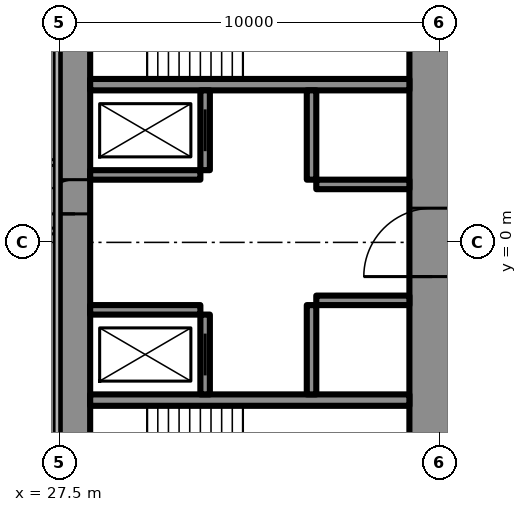
"""IFC4 building model, lengths in metres.
Left out: names, types, materials, properties, quantities, classifications, styles, units other than length and angle.
Written with IfcOpenShell. Run it as: python <this file> out.ifc"""

import sys

from ifc_helpers import new_model, si_unit, direction, frame, frame_2d, origin, place, context, subcontext, project, spatial, rectangle, extrude, element, fill, save


model = new_model("IFC4")
c1 = context("Model", 3, precision=1e-05, world=origin(), true_north=direction((0.0, 1.0)))
c2 = subcontext(c1, "Body", "Model", "MODEL_VIEW")
j1 = project(units=[si_unit("LENGTHUNIT", "METRE"), si_unit("PLANEANGLEUNIT", "RADIAN")], contexts=[c1])
p1 = place(None, origin())
s1 = spatial("IfcSite", under=j1, at=p1, CompositionType="ELEMENT")
p2 = place(p1, origin())
s2 = spatial("IfcBuilding", under=s1, at=p2, CompositionType="ELEMENT")
p3 = place(p2, frame((0.0, 0.0, 244.1)))
s3 = spatial("IfcBuildingStorey", under=s2, at=p3, CompositionType="ELEMENT", Elevation=244.1)
p4 = place(p3, frame((27.9, -8.6, 0.0), z_axis=(0.0, 0.0, 1.0), x_axis=(0.0, 1.0, 0.0)))
e1 = element("IfcWall", 1, at=p4, inside=s3, PredefinedType="SHEAR", context=c2, shape_type="SweptSolid", body=[
    extrude(rectangle(XDim=17.2, YDim=0.8, at=frame_2d((8.6, 0.0))), origin(), (0.0, 0.0, 1.0), 3.6),
])
p5 = place(p4, frame((9.35, 0.0, 0.0)))
e2 = element("IfcOpeningElement", 2, at=p5, cuts=e1, PredefinedType="OPENING", context=c2, shape_type="SweptSolid", body=[
    extrude(rectangle(XDim=0.9, YDim=2.2, at=frame_2d((0.45, 1.1))), frame((0.0, 0.41, 0.0), z_axis=(0.0, -1.0, 0.0), x_axis=(1.0, 0.0, 0.0)), (0.0, 0.0, 1.0), 0.82),
])
p6 = place(p3, frame((37.3, -8.6, 0.0), z_axis=(0.0, 0.0, 1.0), x_axis=(0.0, 1.0, 0.0)))
e3 = element("IfcWall", 3, at=p6, inside=s3, PredefinedType="SHEAR", context=c2, shape_type="SweptSolid", body=[
    extrude(rectangle(XDim=17.2, YDim=1.2, at=frame_2d((8.6, 0.0))), origin(), (0.0, 0.0, 1.0), 3.6),
])
p7 = place(p6, frame((7.7, 0.0, 0.0)))
e4 = element("IfcOpeningElement", 4, at=p7, cuts=e3, PredefinedType="OPENING", context=c2, shape_type="SweptSolid", body=[
    extrude(rectangle(XDim=1.8, YDim=2.2, at=frame_2d((0.9, 1.1))), frame((0.0, 0.61, 0.0), z_axis=(0.0, -1.0, 0.0), x_axis=(1.0, 0.0, 0.0)), (0.0, 0.0, 1.0), 1.22),
])
for number, where, z_axis, x_axis in (
    (5, (28.3, -4.15, 0.0), (0.0, 0.0, 1.0), (1.0, 0.0, 0.0)),
    (6, (28.3, 4.15, 0.0), (0.0, 0.0, 1.0), (1.0, 0.0, 0.0)),
):
    element("IfcWall", number, at=place(p3, frame(where, z_axis=z_axis, x_axis=x_axis)), inside=s3, PredefinedType="SHEAR", context=c2, shape_type="SweptSolid", body=[
        extrude(rectangle(XDim=8.4, YDim=0.3, at=frame_2d((4.2, 0.0))), origin(), (0.0, 0.0, 1.0), 3.6),
    ])
p8 = place(p3, frame((31.325, -4.0, 0.0), z_axis=(0.0, 0.0, 1.0), x_axis=(0.0, 1.0, 0.0)))
e7 = element("IfcWall", 7, at=p8, inside=s3, PredefinedType="SHEAR", context=c2, shape_type="SweptSolid", body=[
    extrude(rectangle(XDim=2.1, YDim=0.25, at=frame_2d((1.05, 0.0))), origin(), (0.0, 0.0, 1.0), 3.6),
])
p9 = place(p8, frame((0.5, 0.0, 0.0)))
e8 = element("IfcOpeningElement", 8, at=p9, cuts=e7, PredefinedType="OPENING", context=c2, shape_type="SweptSolid", body=[
    extrude(rectangle(XDim=1.1, YDim=2.2, at=frame_2d((0.55, 1.1))), frame((0.0, 0.135, 0.0), z_axis=(0.0, -1.0, 0.0), x_axis=(1.0, 0.0, 0.0)), (0.0, 0.0, 1.0), 0.27),
])
p10 = place(p3, frame((34.125, -4.0, 0.0), z_axis=(0.0, 0.0, 1.0), x_axis=(0.0, 1.0, 0.0)))
e9 = element("IfcWall", 9, at=p10, inside=s3, PredefinedType="SHEAR", context=c2, shape_type="SweptSolid", body=[
    extrude(rectangle(XDim=2.35, YDim=0.25, at=frame_2d((1.175, 0.0))), origin(), (0.0, 0.0, 1.0), 3.6),
])
p11 = place(p3, frame((28.3, -1.775, 0.0), z_axis=(0.0, 0.0, 1.0), x_axis=(1.0, 0.0, 0.0)))
e10 = element("IfcWall", 10, at=p11, inside=s3, PredefinedType="SHEAR", context=c2, shape_type="SweptSolid", body=[
    extrude(rectangle(XDim=2.9, YDim=0.25, at=frame_2d((1.45, 0.0))), origin(), (0.0, 0.0, 1.0), 3.6),
])
p12 = place(p3, frame((34.25, -1.525, 0.0), z_axis=(0.0, 0.0, 1.0), x_axis=(1.0, 0.0, 0.0)))
e11 = element("IfcWall", 11, at=p12, inside=s3, PredefinedType="SHEAR", context=c2, shape_type="SweptSolid", body=[
    extrude(rectangle(XDim=2.45, YDim=0.25, at=frame_2d((1.225, 0.0))), origin(), (0.0, 0.0, 1.0), 3.6),
])
p13 = place(p3, frame((31.325, 1.9, 0.0), z_axis=(0.0, 0.0, 1.0), x_axis=(0.0, 1.0, 0.0)))
e12 = element("IfcWall", 12, at=p13, inside=s3, PredefinedType="SHEAR", context=c2, shape_type="SweptSolid", body=[
    extrude(rectangle(XDim=2.1, YDim=0.25, at=frame_2d((1.05, 0.0))), origin(), (0.0, 0.0, 1.0), 3.6),
])
p14 = place(p13, frame((0.5, 0.0, 0.0)))
e13 = element("IfcOpeningElement", 13, at=p14, cuts=e12, PredefinedType="OPENING", context=c2, shape_type="SweptSolid", body=[
    extrude(rectangle(XDim=1.1, YDim=2.2, at=frame_2d((0.55, 1.1))), frame((0.0, 0.135, 0.0), z_axis=(0.0, -1.0, 0.0), x_axis=(1.0, 0.0, 0.0)), (0.0, 0.0, 1.0), 0.27),
])
p15 = place(p3, frame((34.125, 1.65, 0.0), z_axis=(0.0, 0.0, 1.0), x_axis=(0.0, 1.0, 0.0)))
e14 = element("IfcWall", 14, at=p15, inside=s3, PredefinedType="SHEAR", context=c2, shape_type="SweptSolid", body=[
    extrude(rectangle(XDim=2.35, YDim=0.25, at=frame_2d((1.175, 0.0))), origin(), (0.0, 0.0, 1.0), 3.6),
])
p16 = place(p3, frame((28.3, 1.775, 0.0), z_axis=(0.0, 0.0, 1.0), x_axis=(1.0, 0.0, 0.0)))
e15 = element("IfcWall", 15, at=p16, inside=s3, PredefinedType="SHEAR", context=c2, shape_type="SweptSolid", body=[
    extrude(rectangle(XDim=2.9, YDim=0.25, at=frame_2d((1.45, 0.0))), origin(), (0.0, 0.0, 1.0), 3.6),
])
p17 = place(p3, frame((34.25, 1.525, 0.0), z_axis=(0.0, 0.0, 1.0), x_axis=(1.0, 0.0, 0.0)))
e16 = element("IfcWall", 16, at=p17, inside=s3, PredefinedType="SHEAR", context=c2, shape_type="SweptSolid", body=[
    extrude(rectangle(XDim=2.45, YDim=0.25, at=frame_2d((1.225, 0.0))), origin(), (0.0, 0.0, 1.0), 3.6),
])
p18 = place(p3, frame((27.2, -13.8, 0.0), z_axis=(0.0, 0.0, 1.0), x_axis=(0.866027159892, 0.499996958321, 0.0)))
e17 = element("IfcWall", 17, at=p18, inside=s3, PredefinedType="SHEAR", context=c2, shape_type="SweptSolid", body=[
    extrude(rectangle(XDim=27.947, YDim=1.2, at=frame_2d((13.973, 0.0))), origin(), (0.0, 0.0, 1.0), 3.6),
])
p19 = place(p18, frame((4.6, 0.0, 0.0)))
e18 = element("IfcOpeningElement", 18, at=p19, cuts=e17, PredefinedType="OPENING", context=c2, shape_type="SweptSolid", body=[
    extrude(rectangle(XDim=1.0, YDim=2.2, at=frame_2d((0.5, 1.1))), frame((0.0, 0.61, 0.0), z_axis=(0.0, -1.0, 0.0), x_axis=(1.0, 0.0, 0.0)), (0.0, 0.0, 1.0), 1.22),
])
p20 = place(p18, frame((13.395, 0.0, 0.0)))
e19 = element("IfcOpeningElement", 19, at=p20, cuts=e17, PredefinedType="OPENING", context=c2, shape_type="SweptSolid", body=[
    extrude(rectangle(XDim=1.8, YDim=2.2, at=frame_2d((0.9, 1.1))), frame((0.0, 0.61, 0.0), z_axis=(0.0, -1.0, 0.0), x_axis=(1.0, 0.0, 0.0)), (0.0, 0.0, 1.0), 1.22),
])
p21 = place(p3, frame((27.2, 13.8, 0.0), z_axis=(0.0, 0.0, 1.0), x_axis=(0.866024515034, -0.500001539357, 0.0)))
e20 = element("IfcWall", 20, at=p21, inside=s3, PredefinedType="SHEAR", context=c2, shape_type="SweptSolid", body=[
    extrude(rectangle(XDim=26.907, YDim=1.2, at=frame_2d((13.454, 0.0))), origin(), (0.0, 0.0, 1.0), 3.6),
])
p22 = place(p21, frame((4.6, 0.0, 0.0)))
e21 = element("IfcOpeningElement", 21, at=p22, cuts=e20, PredefinedType="OPENING", context=c2, shape_type="SweptSolid", body=[
    extrude(rectangle(XDim=1.0, YDim=2.2, at=frame_2d((0.5, 1.1))), frame((0.0, 0.61, 0.0), z_axis=(0.0, -1.0, 0.0), x_axis=(1.0, 0.0, 0.0)), (0.0, 0.0, 1.0), 1.22),
])
p23 = place(p21, frame((13.395, 0.0, 0.0)))
e22 = element("IfcOpeningElement", 22, at=p23, cuts=e20, PredefinedType="OPENING", context=c2, shape_type="SweptSolid", body=[
    extrude(rectangle(XDim=1.8, YDim=2.2, at=frame_2d((0.9, 1.1))), frame((0.0, 0.61, 0.0), z_axis=(0.0, -1.0, 0.0), x_axis=(1.0, 0.0, 0.0)), (0.0, 0.0, 1.0), 1.22),
])
p24 = place(p3, frame((28.959, -15.44, 0.0), z_axis=(0.0, 0.0, 1.0), x_axis=(0.866025227435, 0.500000305447, 0.0)))
e23 = element("IfcWall", 23, at=p24, inside=s3, PredefinedType="PARTITIONING", context=c2, shape_type="SweptSolid", body=[
    extrude(rectangle(XDim=30.88, YDim=0.2, at=frame_2d((15.44, 0.0))), origin(), (0.0, 0.0, 1.0), 3.35),
])
p25 = place(p24, frame((1.494, 0.0, 0.0)))
e24 = element("IfcOpeningElement", 24, at=p25, cuts=e23, PredefinedType="OPENING", context=c2, shape_type="SweptSolid", body=[
    extrude(rectangle(XDim=1.8, YDim=2.04, at=frame_2d((0.9, 1.02))), frame((0.0, 0.11, 0.0), z_axis=(0.0, -1.0, 0.0), x_axis=(1.0, 0.0, 0.0)), (0.0, 0.0, 1.0), 0.22),
])
p26 = place(p24, frame((7.687, 0.0, 0.0)))
e25 = element("IfcOpeningElement", 25, at=p26, cuts=e23, PredefinedType="OPENING", context=c2, shape_type="SweptSolid", body=[
    extrude(rectangle(XDim=1.0, YDim=2.2, at=frame_2d((0.5, 1.1))), frame((0.0, 0.11, 0.0), z_axis=(0.0, -1.0, 0.0), x_axis=(1.0, 0.0, 0.0)), (0.0, 0.0, 1.0), 0.22),
])
p27 = place(p24, frame((18.321, 0.0, 0.0)))
e26 = element("IfcOpeningElement", 26, at=p27, cuts=e23, PredefinedType="OPENING", context=c2, shape_type="SweptSolid", body=[
    extrude(rectangle(XDim=0.95, YDim=2.2, at=frame_2d((0.475, 1.1))), frame((0.0, 0.11, 0.0), z_axis=(0.0, -1.0, 0.0), x_axis=(1.0, 0.0, 0.0)), (0.0, 0.0, 1.0), 0.22),
])
p28 = place(p24, frame((22.203, 0.0, 0.0)))
e27 = element("IfcOpeningElement", 27, at=p28, cuts=e23, PredefinedType="OPENING", context=c2, shape_type="SweptSolid", body=[
    extrude(rectangle(XDim=0.95, YDim=2.2, at=frame_2d((0.475, 1.1))), frame((0.0, 0.11, 0.0), z_axis=(0.0, -1.0, 0.0), x_axis=(1.0, 0.0, 0.0)), (0.0, 0.0, 1.0), 0.22),
])
p29 = place(p24, frame((26.192, 0.0, 0.0)))
e28 = element("IfcOpeningElement", 28, at=p29, cuts=e23, PredefinedType="OPENING", context=c2, shape_type="SweptSolid", body=[
    extrude(rectangle(XDim=1.8, YDim=2.2, at=frame_2d((0.9, 1.1))), frame((0.0, 0.11, 0.0), z_axis=(0.0, -1.0, 0.0), x_axis=(1.0, 0.0, 0.0)), (0.0, 0.0, 1.0), 0.22),
])
p30 = place(p3, frame((-27.5, 0.3, 0.0), z_axis=(0.0, 0.0, 1.0), x_axis=(1.0, 0.0, 0.0)))
e29 = element("IfcWall", 29, at=p30, inside=s3, PredefinedType="PARTITIONING", context=c2, shape_type="SweptSolid", body=[
    extrude(rectangle(XDim=55.0, YDim=0.15, at=frame_2d((27.5, 0.0))), origin(), (0.0, 0.0, 1.0), 2.4),
])
p31 = place(p30, frame((1.575, 0.0, 0.0)))
e30 = element("IfcOpeningElement", 30, at=p31, cuts=e29, PredefinedType="OPENING", context=c2, shape_type="SweptSolid", body=[
    extrude(rectangle(XDim=1.0, YDim=2.2, at=frame_2d((0.5, 1.1))), frame((0.0, 0.085, 0.0), z_axis=(0.0, -1.0, 0.0), x_axis=(1.0, 0.0, 0.0)), (0.0, 0.0, 1.0), 0.17),
])
p32 = place(p30, frame((8.525, 0.0, 0.0)))
e31 = element("IfcOpeningElement", 31, at=p32, cuts=e29, PredefinedType="OPENING", context=c2, shape_type="SweptSolid", body=[
    extrude(rectangle(XDim=1.05, YDim=2.4, at=frame_2d((0.525, 1.2))), frame((0.0, 0.085, 0.0), z_axis=(0.0, -1.0, 0.0), x_axis=(1.0, 0.0, 0.0)), (0.0, 0.0, 1.0), 0.17),
])
p33 = place(p30, frame((14.025, 0.0, 0.0)))
e32 = element("IfcOpeningElement", 32, at=p33, cuts=e29, PredefinedType="OPENING", context=c2, shape_type="SweptSolid", body=[
    extrude(rectangle(XDim=1.05, YDim=2.4, at=frame_2d((0.525, 1.2))), frame((0.0, 0.085, 0.0), z_axis=(0.0, -1.0, 0.0), x_axis=(1.0, 0.0, 0.0)), (0.0, 0.0, 1.0), 0.17),
])
p34 = place(p30, frame((25.025, 0.0, 0.0)))
e33 = element("IfcOpeningElement", 33, at=p34, cuts=e29, PredefinedType="OPENING", context=c2, shape_type="SweptSolid", body=[
    extrude(rectangle(XDim=1.05, YDim=2.4, at=frame_2d((0.525, 1.2))), frame((0.0, 0.085, 0.0), z_axis=(0.0, -1.0, 0.0), x_axis=(1.0, 0.0, 0.0)), (0.0, 0.0, 1.0), 0.17),
])
p35 = place(p30, frame((30.525, 0.0, 0.0)))
e34 = element("IfcOpeningElement", 34, at=p35, cuts=e29, PredefinedType="OPENING", context=c2, shape_type="SweptSolid", body=[
    extrude(rectangle(XDim=1.05, YDim=2.4, at=frame_2d((0.525, 1.2))), frame((0.0, 0.085, 0.0), z_axis=(0.0, -1.0, 0.0), x_axis=(1.0, 0.0, 0.0)), (0.0, 0.0, 1.0), 0.17),
])
p36 = place(p30, frame((41.525, 0.0, 0.0)))
e35 = element("IfcOpeningElement", 35, at=p36, cuts=e29, PredefinedType="OPENING", context=c2, shape_type="SweptSolid", body=[
    extrude(rectangle(XDim=1.05, YDim=2.4, at=frame_2d((0.525, 1.2))), frame((0.0, 0.085, 0.0), z_axis=(0.0, -1.0, 0.0), x_axis=(1.0, 0.0, 0.0)), (0.0, 0.0, 1.0), 0.17),
])
p37 = place(p30, frame((47.025, 0.0, 0.0)))
e36 = element("IfcOpeningElement", 36, at=p37, cuts=e29, PredefinedType="OPENING", context=c2, shape_type="SweptSolid", body=[
    extrude(rectangle(XDim=1.05, YDim=2.4, at=frame_2d((0.525, 1.2))), frame((0.0, 0.085, 0.0), z_axis=(0.0, -1.0, 0.0), x_axis=(1.0, 0.0, 0.0)), (0.0, 0.0, 1.0), 0.17),
])
p38 = place(p30, frame((52.525, 0.0, 0.0)))
e37 = element("IfcOpeningElement", 37, at=p38, cuts=e29, PredefinedType="OPENING", context=c2, shape_type="SweptSolid", body=[
    extrude(rectangle(XDim=1.05, YDim=2.4, at=frame_2d((0.525, 1.2))), frame((0.0, 0.085, 0.0), z_axis=(0.0, -1.0, 0.0), x_axis=(1.0, 0.0, 0.0)), (0.0, 0.0, 1.0), 0.17),
])
p39 = place(p3, frame((-10.65, 2.1, 0.0), z_axis=(0.0, 0.0, 1.0), x_axis=(1.0, 0.0, 0.0)))
e38 = element("IfcWall", 38, at=p39, inside=s3, PredefinedType="PARTITIONING", context=c2, shape_type="SweptSolid", body=[
    extrude(rectangle(XDim=38.15, YDim=0.15, at=frame_2d((19.075, 0.0))), origin(), (0.0, 0.0, 1.0), 3.4),
])
p40 = place(p39, frame((2.675, 0.0, 0.0)))
e39 = element("IfcOpeningElement", 39, at=p40, cuts=e38, PredefinedType="OPENING", context=c2, shape_type="SweptSolid", body=[
    extrude(rectangle(XDim=1.05, YDim=2.4, at=frame_2d((0.525, 1.2))), frame((0.0, 0.085, 0.0), z_axis=(0.0, -1.0, 0.0), x_axis=(1.0, 0.0, 0.0)), (0.0, 0.0, 1.0), 0.17),
])
p41 = place(p39, frame((13.675, 0.0, 0.0)))
e40 = element("IfcOpeningElement", 40, at=p41, cuts=e38, PredefinedType="OPENING", context=c2, shape_type="SweptSolid", body=[
    extrude(rectangle(XDim=1.05, YDim=2.4, at=frame_2d((0.525, 1.2))), frame((0.0, 0.085, 0.0), z_axis=(0.0, -1.0, 0.0), x_axis=(1.0, 0.0, 0.0)), (0.0, 0.0, 1.0), 0.17),
])
p42 = place(p39, frame((24.675, 0.0, 0.0)))
e41 = element("IfcOpeningElement", 41, at=p42, cuts=e38, PredefinedType="OPENING", context=c2, shape_type="SweptSolid", body=[
    extrude(rectangle(XDim=1.05, YDim=2.4, at=frame_2d((0.525, 1.2))), frame((0.0, 0.085, 0.0), z_axis=(0.0, -1.0, 0.0), x_axis=(1.0, 0.0, 0.0)), (0.0, 0.0, 1.0), 0.17),
])
p43 = place(p39, frame((30.175, 0.0, 0.0)))
e42 = element("IfcOpeningElement", 42, at=p43, cuts=e38, PredefinedType="OPENING", context=c2, shape_type="SweptSolid", body=[
    extrude(rectangle(XDim=1.05, YDim=2.4, at=frame_2d((0.525, 1.2))), frame((0.0, 0.085, 0.0), z_axis=(0.0, -1.0, 0.0), x_axis=(1.0, 0.0, 0.0)), (0.0, 0.0, 1.0), 0.17),
])
p44 = place(p39, frame((35.675, 0.0, 0.0)))
e43 = element("IfcOpeningElement", 43, at=p44, cuts=e38, PredefinedType="OPENING", context=c2, shape_type="SweptSolid", body=[
    extrude(rectangle(XDim=1.05, YDim=2.4, at=frame_2d((0.525, 1.2))), frame((0.0, 0.085, 0.0), z_axis=(0.0, -1.0, 0.0), x_axis=(1.0, 0.0, 0.0)), (0.0, 0.0, 1.0), 0.17),
])
p45 = place(p7, origin())
e44 = element("IfcDoor", 44, at=p45, inside=s3, OperationType="DOUBLE_DOOR_SINGLE_SWING", PredefinedType="DOOR", context=c2, shape_type="SweptSolid", body=[
    extrude(rectangle(XDim=1.8, YDim=2.2, at=frame_2d((0.9, 1.1))), frame((0.0, 0.025, 0.0), z_axis=(0.0, -1.0, 0.0), x_axis=(1.0, 0.0, 0.0)), (0.0, 0.0, 1.0), 0.05),
])
fill(e4, e44)
p46 = place(p5, origin())
e45 = element("IfcDoor", 45, at=p46, inside=s3, OperationType="SINGLE_SWING_LEFT", PredefinedType="DOOR", context=c2, shape_type="SweptSolid", body=[
    extrude(rectangle(XDim=0.9, YDim=2.2, at=frame_2d((0.45, 1.1))), frame((0.0, 0.025, 0.0), z_axis=(0.0, -1.0, 0.0), x_axis=(1.0, 0.0, 0.0)), (0.0, 0.0, 1.0), 0.05),
])
fill(e2, e45)
p47 = place(p9, origin())
e46 = element("IfcDoor", 46, at=p47, inside=s3, OperationType="SLIDING_TO_LEFT", PredefinedType="USERDEFINED", context=c2, shape_type="SweptSolid", body=[
    extrude(rectangle(XDim=1.1, YDim=2.2, at=frame_2d((0.55, 1.1))), frame((0.0, 0.025, 0.0), z_axis=(0.0, -1.0, 0.0), x_axis=(1.0, 0.0, 0.0)), (0.0, 0.0, 1.0), 0.05),
])
fill(e8, e46)
p48 = place(p14, origin())
e47 = element("IfcDoor", 47, at=p48, inside=s3, OperationType="SLIDING_TO_LEFT", PredefinedType="USERDEFINED", context=c2, shape_type="SweptSolid", body=[
    extrude(rectangle(XDim=1.1, YDim=2.2, at=frame_2d((0.55, 1.1))), frame((0.0, 0.025, 0.0), z_axis=(0.0, -1.0, 0.0), x_axis=(1.0, 0.0, 0.0)), (0.0, 0.0, 1.0), 0.05),
])
fill(e13, e47)
save(model, sys.argv[1])
